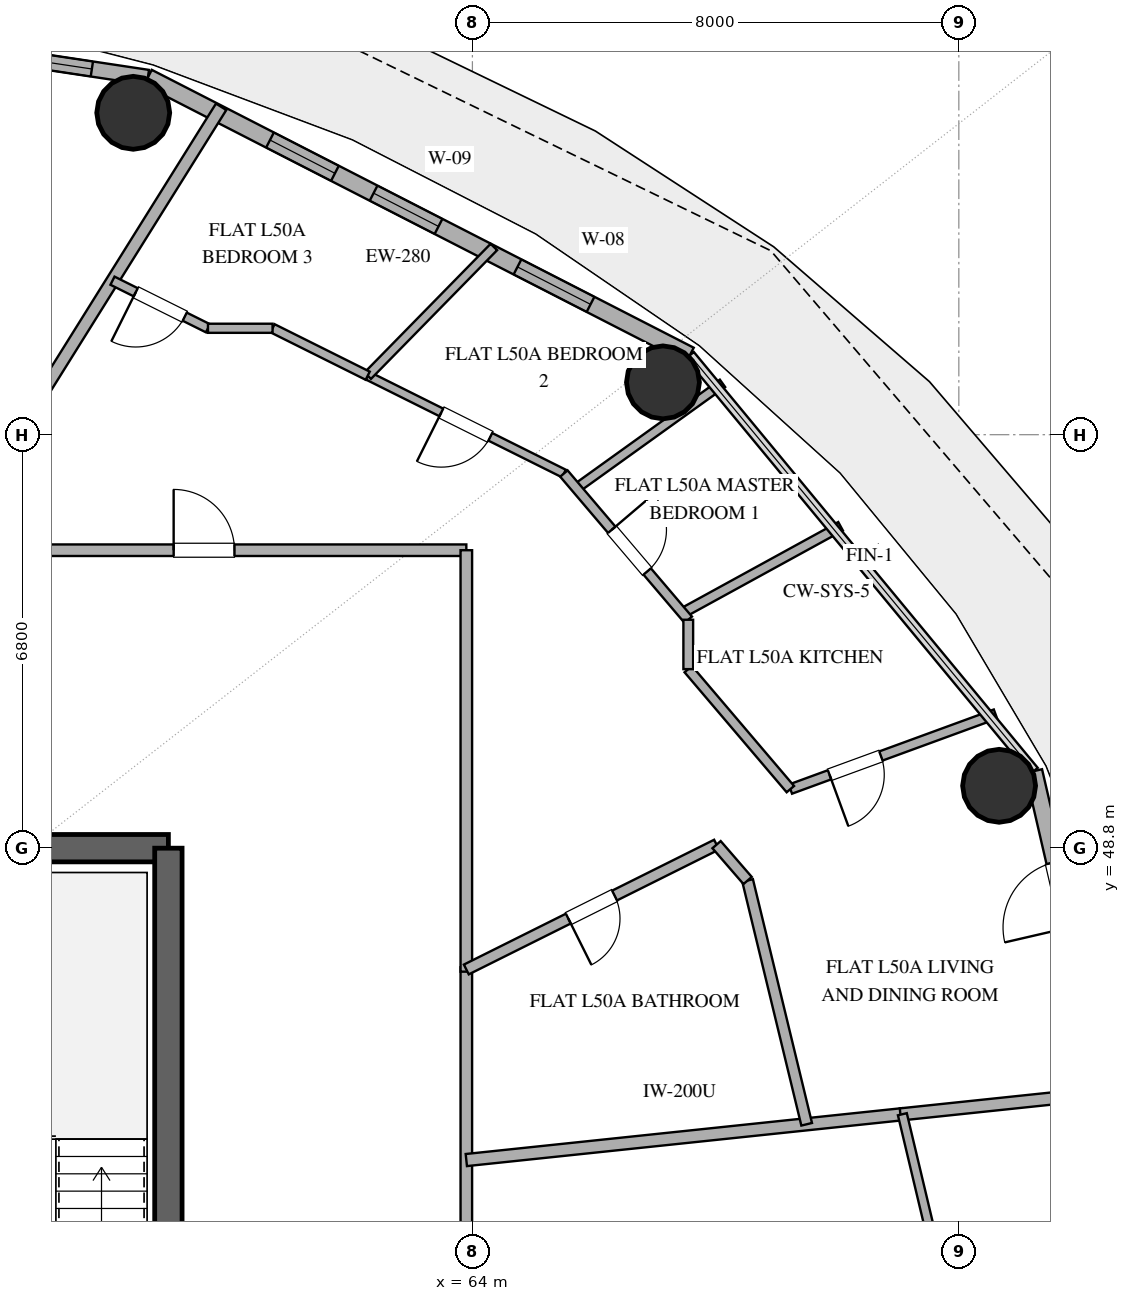
"""IFC4 building model, lengths in metres.
Left out: names, types, materials, properties, quantities, classifications, styles, units other than length and angle.
Written with IfcOpenShell. Run it as: python <this file> out.ifc"""

import sys

from ifc_helpers import new_model, si_unit, direction, frame, frame_2d, origin, origin_2d, place, context, subcontext, project, spatial, rectangle, hollow_circle, extrude, element, fill, save


model = new_model("IFC4")
c1 = context("Model", 3, precision=1e-05, world=origin(), true_north=direction((0.0, 1.0)))
c2 = subcontext(c1, "Body", "Model", "MODEL_VIEW")
j1 = project(units=[si_unit("LENGTHUNIT", "METRE"), si_unit("PLANEANGLEUNIT", "RADIAN")], contexts=[c1])
p1 = place(None, origin())
s1 = spatial("IfcSite", under=j1, at=p1, CompositionType="ELEMENT")
p2 = place(p1, origin())
s2 = spatial("IfcBuilding", under=s1, at=p2, CompositionType="ELEMENT")
p3 = place(p2, frame((0.0, 0.0, 197.4)))
s3 = spatial("IfcBuildingStorey", under=s2, at=p3, CompositionType="ELEMENT", Elevation=197.4)
p4 = place(p3, frame((55.0, 48.8, 0.0), z_axis=(0.0, 0.0, 1.0), x_axis=(1.0, 0.0, 0.0)))
e1 = element("IfcWall", 1, at=p4, inside=s3, PredefinedType="SHEAR", context=c2, shape_type="SweptSolid", body=[
    extrude(rectangle(XDim=4.0, YDim=0.45, at=frame_2d((2.0, 0.0))), origin(), (0.0, 0.0, 1.0), 3.25),
])
p5 = place(p3, frame((59.0, 35.2, 0.0), z_axis=(0.0, 0.0, 1.0), x_axis=(0.0, 1.0, 0.0)))
e2 = element("IfcWall", 2, at=p5, inside=s3, PredefinedType="SHEAR", context=c2, shape_type="SweptSolid", body=[
    extrude(rectangle(XDim=13.6, YDim=0.45, at=frame_2d((6.8, 0.0))), origin(), (0.0, 0.0, 1.0), 3.25),
])
for number, where, z_axis, x_axis in (
    (3, (72.662, 49.826, 0.0), (0.0, 0.0, 1.0), (1.0, 0.0, 0.0)),
    (4, (67.134, 56.46, 0.0), (0.0, 0.0, 1.0), (1.0, 0.0, 0.0)),
    (5, (58.422, 60.893, 0.0), (0.0, 0.0, 1.0), (1.0, 0.0, 0.0)),
):
    element("IfcColumn", number, at=place(p3, frame(where, z_axis=z_axis, x_axis=x_axis)), inside=s3, PredefinedType="COLUMN", context=c2, shape_type="SweptSolid", body=[
        extrude(hollow_circle(Radius=0.6, WallThickness=0.032, at=origin_2d()), origin(), (0.0, 0.0, 1.0), 3.25),
    ])
p6 = place(p3, frame((75.099, 42.0, 0.0), z_axis=(0.0, 0.0, 1.0), x_axis=(-0.225473184558, 0.974249374157, 0.0)))
e6 = element("IfcWall", 6, at=p6, inside=s3, PredefinedType="SOLIDWALL", context=c2, shape_type="SweptSolid", body=[
    extrude(rectangle(XDim=8.28, YDim=0.28, at=frame_2d((4.14, 0.0))), origin(), (0.0, 0.0, 1.0), 3.25),
])
p7 = place(p6, frame((5.644, 0.0, 0.0)))
e7 = element("IfcOpeningElement", 7, at=p7, cuts=e6, PredefinedType="OPENING", context=c2, shape_type="SweptSolid", body=[
    extrude(rectangle(XDim=1.1, YDim=2.25, at=frame_2d((0.55, 1.125))), frame((0.0, 0.15, 0.0), z_axis=(0.0, -1.0, 0.0), x_axis=(1.0, 0.0, 0.0)), (0.0, 0.0, 1.0), 0.3),
])
p8 = place(p6, frame((0.918, 0.0, 0.85)))
e8 = element("IfcOpeningElement", 8, at=p8, cuts=e6, PredefinedType="OPENING", context=c2, shape_type="SweptSolid", body=[
    extrude(rectangle(XDim=1.0, YDim=1.8, at=frame_2d((0.5, 0.9))), frame((0.0, 0.15, 0.0), z_axis=(0.0, -1.0, 0.0), x_axis=(1.0, 0.0, 0.0)), (0.0, 0.0, 1.0), 0.3),
])
p9 = place(p3, frame((67.576, 56.906, 0.0), z_axis=(0.0, 0.0, 1.0), x_axis=(-0.889872523182, 0.456209263919, 0.0)))
e9 = element("IfcWall", 9, at=p9, inside=s3, PredefinedType="SOLIDWALL", context=c2, shape_type="SweptSolid", body=[
    extrude(rectangle(XDim=10.016, YDim=0.28, at=frame_2d((5.008, 0.0))), origin(), (0.0, 0.0, 1.0), 3.25),
])
p10 = place(p9, frame((1.835, 0.0, 0.85)))
e10 = element("IfcOpeningElement", 10, at=p10, cuts=e9, PredefinedType="OPENING", context=c2, shape_type="SweptSolid", body=[
    extrude(rectangle(XDim=1.35, YDim=1.8, at=frame_2d((0.675, 0.9))), frame((0.0, 0.15, 0.0), z_axis=(0.0, -1.0, 0.0), x_axis=(1.0, 0.0, 0.0)), (0.0, 0.0, 1.0), 0.3),
])
p11 = place(p9, frame((4.645, 0.0, 0.85)))
e11 = element("IfcOpeningElement", 11, at=p11, cuts=e9, PredefinedType="OPENING", context=c2, shape_type="SweptSolid", body=[
    extrude(rectangle(XDim=1.2, YDim=1.8, at=frame_2d((0.6, 0.9))), frame((0.0, 0.15, 0.0), z_axis=(0.0, -1.0, 0.0), x_axis=(1.0, 0.0, 0.0)), (0.0, 0.0, 1.0), 0.3),
])
p12 = place(p9, frame((6.559, 0.0, 0.85)))
e12 = element("IfcOpeningElement", 12, at=p12, cuts=e9, PredefinedType="OPENING", context=c2, shape_type="SweptSolid", body=[
    extrude(rectangle(XDim=1.2, YDim=1.8, at=frame_2d((0.6, 0.9))), frame((0.0, 0.15, 0.0), z_axis=(0.0, -1.0, 0.0), x_axis=(1.0, 0.0, 0.0)), (0.0, 0.0, 1.0), 0.3),
])
p13 = place(p3, frame((58.663, 61.475, 0.0), z_axis=(0.0, 0.0, 1.0), x_axis=(-0.988863993413, 0.148822049884, 0.0)))
e13 = element("IfcWall", 13, at=p13, inside=s3, PredefinedType="SOLIDWALL", context=c2, shape_type="SweptSolid", body=[
    extrude(rectangle(XDim=10.783, YDim=0.25, at=frame_2d((5.392, 0.0))), origin(), (0.0, 0.0, 1.0), 3.25),
])
p14 = place(p13, frame((0.932, 0.0, 1.42)))
e14 = element("IfcOpeningElement", 14, at=p14, cuts=e13, PredefinedType="OPENING", context=c2, shape_type="SweptSolid", body=[
    extrude(rectangle(XDim=1.0, YDim=1.05, at=frame_2d((0.5, 0.525))), frame((0.0, 0.135, 0.0), z_axis=(0.0, -1.0, 0.0), x_axis=(1.0, 0.0, 0.0)), (0.0, 0.0, 1.0), 0.27),
])
p15 = place(p3, frame((44.784, 53.7, 0.0), z_axis=(0.0, 0.0, 1.0), x_axis=(1.0, 0.0, 0.0)))
e15 = element("IfcWall", 15, at=p15, inside=s3, PredefinedType="PARTITIONING", context=c2, shape_type="SweptSolid", body=[
    extrude(rectangle(XDim=19.116, YDim=0.19, at=frame_2d((9.558, 0.0))), origin(), (0.0, 0.0, 1.0), 2.61),
])
p16 = place(p15, frame((14.302, 0.0, 0.0)))
e16 = element("IfcOpeningElement", 16, at=p16, cuts=e15, PredefinedType="OPENING", context=c2, shape_type="SweptSolid", body=[
    extrude(rectangle(XDim=1.0, YDim=2.2, at=frame_2d((0.5, 1.1))), frame((0.0, 0.105, 0.0), z_axis=(0.0, -1.0, 0.0), x_axis=(1.0, 0.0, 0.0)), (0.0, 0.0, 1.0), 0.21),
])
p17 = place(p15, frame((6.783, 0.0, 0.0)))
e17 = element("IfcOpeningElement", 17, at=p17, cuts=e15, PredefinedType="OPENING", context=c2, shape_type="SweptSolid", body=[
    extrude(rectangle(XDim=1.0, YDim=2.2, at=frame_2d((0.5, 1.1))), frame((0.0, 0.105, 0.0), z_axis=(0.0, -1.0, 0.0), x_axis=(1.0, 0.0, 0.0)), (0.0, 0.0, 1.0), 0.21),
])
p18 = place(p3, frame((63.9, 46.841, 0.0), z_axis=(0.0, 0.0, 1.0), x_axis=(0.0, -1.0, 0.0)))
e18 = element("IfcWall", 18, at=p18, inside=s3, PredefinedType="PARTITIONING", context=c2, shape_type="SweptSolid", body=[
    extrude(rectangle(XDim=12.632, YDim=0.19, at=frame_2d((6.316, 0.0))), origin(), (0.0, 0.0, 1.0), 2.61),
])
p19 = place(p3, frame((63.9, 53.7, 0.0), z_axis=(0.0, 0.0, 1.0), x_axis=(0.0, -1.0, 0.0)))
e19 = element("IfcWall", 19, at=p19, inside=s3, PredefinedType="PARTITIONING", context=c2, shape_type="SweptSolid", body=[
    extrude(rectangle(XDim=6.931, YDim=0.19, at=frame_2d((3.465, 0.0))), origin(), (0.0, 0.0, 1.0), 2.61),
])
p20 = place(p3, frame((63.9, 43.671, 0.0), z_axis=(0.0, 0.0, 1.0), x_axis=(0.994523063153, 0.104517351942, 0.0)))
e20 = element("IfcWall", 20, at=p20, inside=s3, PredefinedType="PARTITIONING", context=c2, shape_type="SweptSolid", body=[
    extrude(rectangle(XDim=7.211, YDim=0.2, at=frame_2d((3.605, 0.0))), origin(), (0.0, 0.0, 1.0), 2.61),
])
p21 = place(p3, frame((55.311, 53.7, 0.0), z_axis=(0.0, 0.0, 1.0), x_axis=(0.529914717401, 0.848050937315, 0.0)))
e21 = element("IfcWall", 21, at=p21, inside=s3, PredefinedType="PARTITIONING", context=c2, shape_type="SweptSolid", body=[
    extrude(rectangle(XDim=8.599, YDim=0.2, at=frame_2d((4.299, 0.0))), origin(), (0.0, 0.0, 1.0), 2.61),
])
p22 = place(p3, frame((68.016, 48.858, 0.0), z_axis=(0.0, 0.0, 1.0), x_axis=(-0.894872643331, -0.446321579377, 0.0)))
e22 = element("IfcWall", 22, at=p22, inside=s3, PredefinedType="PLUMBINGWALL", context=c2, shape_type="SweptSolid", body=[
    extrude(rectangle(XDim=4.599, YDim=0.18, at=frame_2d((2.3, 0.0))), origin(), (0.0, 0.0, 1.0), 2.61),
])
p23 = place(p22, frame((1.875, 0.0, 0.0)))
e23 = element("IfcOpeningElement", 23, at=p23, cuts=e22, PredefinedType="OPENING", context=c2, shape_type="SweptSolid", body=[
    extrude(rectangle(XDim=0.85, YDim=2.1, at=frame_2d((0.425, 1.05))), frame((0.0, 0.1, 0.0), z_axis=(0.0, -1.0, 0.0), x_axis=(1.0, 0.0, 0.0)), (0.0, 0.0, 1.0), 0.2),
])
p24 = place(p3, frame((69.498, 44.26, 0.0), z_axis=(0.0, 0.0, 1.0), x_axis=(-0.235510241151, 0.97187186723, 0.0)))
e24 = element("IfcWall", 24, at=p24, inside=s3, PredefinedType="PLUMBINGWALL", context=c2, shape_type="SweptSolid", body=[
    extrude(rectangle(XDim=4.125, YDim=0.18, at=frame_2d((2.062, 0.0))), origin(), (0.0, 0.0, 1.0), 2.61),
])
p25 = place(p3, frame((65.505, 54.961, 0.0), z_axis=(0.0, 0.0, 1.0), x_axis=(-0.894941244144, 0.4461840086, 0.0)))
e25 = element("IfcWall", 25, at=p25, inside=s3, PredefinedType="PARTITIONING", context=c2, shape_type="SweptSolid", body=[
    extrude(rectangle(XDim=3.605, YDim=0.14, at=frame_2d((1.803, 0.0))), origin(), (0.0, 0.0, 1.0), 2.61),
])
p26 = place(p25, frame((1.353, 0.0, 0.0)))
e26 = element("IfcOpeningElement", 26, at=p26, cuts=e25, PredefinedType="OPENING", context=c2, shape_type="SweptSolid", body=[
    extrude(rectangle(XDim=0.9, YDim=2.1, at=frame_2d((0.45, 1.05))), frame((0.0, 0.08, 0.0), z_axis=(0.0, -1.0, 0.0), x_axis=(1.0, 0.0, 0.0)), (0.0, 0.0, 1.0), 0.16),
])
p27 = place(p3, frame((72.603, 51.006, 0.0), z_axis=(0.0, 0.0, 1.0), x_axis=(-0.939057046145, -0.343761347572, 0.0)))
e27 = element("IfcWall", 27, at=p27, inside=s3, PredefinedType="PLUMBINGWALL", context=c2, shape_type="SweptSolid", body=[
    extrude(rectangle(XDim=3.592, YDim=0.16, at=frame_2d((1.796, 0.0))), origin(), (0.0, 0.0, 1.0), 2.61),
])
p28 = place(p27, frame((2.006, 0.0, 0.0)))
e28 = element("IfcOpeningElement", 28, at=p28, cuts=e27, PredefinedType="OPENING", context=c2, shape_type="SweptSolid", body=[
    extrude(rectangle(XDim=0.9, YDim=2.1, at=frame_2d((0.45, 1.05))), frame((0.0, 0.09, 0.0), z_axis=(0.0, -1.0, 0.0), x_axis=(1.0, 0.0, 0.0)), (0.0, 0.0, 1.0), 0.18),
])
p29 = place(p3, frame((74.575, 44.793, 0.0), z_axis=(0.0, 0.0, 1.0), x_axis=(-0.994516359121, -0.104581123727, 0.0)))
e29 = element("IfcWall", 29, at=p29, inside=s3, PredefinedType="PARTITIONING", context=c2, shape_type="SweptSolid", body=[
    extrude(rectangle(XDim=3.555, YDim=0.2, at=frame_2d((1.778, 0.0))), origin(), (0.0, 0.0, 1.0), 2.61),
])
p30 = place(p3, frame((67.455, 52.668, 0.0), z_axis=(0.0, 0.0, 1.0), x_axis=(0.876839283097, 0.480783601653, 0.0)))
e30 = element("IfcWall", 30, at=p30, inside=s3, PredefinedType="PLUMBINGWALL", context=c2, shape_type="SweptSolid", body=[
    extrude(rectangle(XDim=2.965, YDim=0.16, at=frame_2d((1.482, 0.0))), origin(), (0.0, 0.0, 1.0), 2.61),
])
p31 = place(p3, frame((64.353, 58.687, 0.0), z_axis=(0.0, 0.0, 1.0), x_axis=(-0.699905055024, -0.714235895172, 0.0)))
e31 = element("IfcWall", 31, at=p31, inside=s3, PredefinedType="PARTITIONING", context=c2, shape_type="SweptSolid", body=[
    extrude(rectangle(XDim=2.964, YDim=0.15, at=frame_2d((1.482, 0.0))), origin(), (0.0, 0.0, 1.0), 2.61),
])
p32 = place(p3, frame((68.113, 56.444, 0.0), z_axis=(0.0, 0.0, 1.0), x_axis=(-0.812258557349, -0.583297553581, 0.0)))
e32 = element("IfcWall", 32, at=p32, inside=s3, PredefinedType="PARTITIONING", context=c2, shape_type="SweptSolid", body=[
    extrude(rectangle(XDim=2.958, YDim=0.15, at=frame_2d((1.479, 0.0))), origin(), (0.0, 0.0, 1.0), 2.61),
])
p33 = place(p3, frame((65.505, 54.961, 0.0), z_axis=(0.0, 0.0, 1.0), x_axis=(0.647888606369, -0.761735094201, 0.0)))
e33 = element("IfcWall", 33, at=p33, inside=s3, PredefinedType="PLUMBINGWALL", context=c2, shape_type="SweptSolid", body=[
    extrude(rectangle(XDim=3.157, YDim=0.16, at=frame_2d((1.578, 0.0))), origin(), (0.0, 0.0, 1.0), 2.61),
])
p34 = place(p33, frame((1.215, 0.0, 0.0)))
e34 = element("IfcOpeningElement", 34, at=p34, cuts=e33, PredefinedType="OPENING", context=c2, shape_type="SweptSolid", body=[
    extrude(rectangle(XDim=0.9, YDim=2.1, at=frame_2d((0.45, 1.05))), frame((0.0, 0.09, 0.0), z_axis=(0.0, -1.0, 0.0), x_axis=(1.0, 0.0, 0.0)), (0.0, 0.0, 1.0), 0.18),
])
p35 = place(p3, frame((69.229, 49.771, 0.0), z_axis=(0.0, 0.0, 1.0), x_axis=(-0.648055845939, 0.761592818076, 0.0)))
e35 = element("IfcWall", 35, at=p35, inside=s3, PredefinedType="PLUMBINGWALL", context=c2, shape_type="SweptSolid", body=[
    extrude(rectangle(XDim=2.591, YDim=0.16, at=frame_2d((1.295, 0.0))), origin(), (0.0, 0.0, 1.0), 2.61),
])
p36 = place(p3, frame((71.649, 42.0, 0.0), z_axis=(0.0, 0.0, 1.0), x_axis=(-0.231642596653, 0.972800959814, 0.0)))
e36 = element("IfcWall", 36, at=p36, inside=s3, PredefinedType="PARTITIONING", context=c2, shape_type="SweptSolid", body=[
    extrude(rectangle(XDim=2.493, YDim=0.15, at=frame_2d((1.246, 0.0))), origin(), (0.0, 0.0, 1.0), 2.61),
])
p37 = place(p3, frame((59.651, 57.35, 0.0), z_axis=(0.0, 0.0, 1.0), x_axis=(-0.895038630404, 0.445988621027, 0.0)))
e37 = element("IfcWall", 37, at=p37, inside=s3, PredefinedType="PARTITIONING", context=c2, shape_type="SweptSolid", body=[
    extrude(rectangle(XDim=1.754, YDim=0.15, at=frame_2d((0.877, 0.0))), origin(), (0.0, 0.0, 1.0), 2.61),
])
p38 = place(p37, frame((0.427, 0.0, 0.0)))
e38 = element("IfcOpeningElement", 38, at=p38, cuts=e37, PredefinedType="OPENING", context=c2, shape_type="SweptSolid", body=[
    extrude(rectangle(XDim=0.9, YDim=2.1, at=frame_2d((0.45, 1.05))), frame((0.0, 0.085, 0.0), z_axis=(0.0, -1.0, 0.0), x_axis=(1.0, 0.0, 0.0)), (0.0, 0.0, 1.0), 0.17),
])
p39 = place(p3, frame((62.278, 56.57, 0.0), z_axis=(0.0, 0.0, 1.0), x_axis=(-0.894929238491, 0.446208088333, 0.0)))
e39 = element("IfcWall", 39, at=p39, inside=s3, PredefinedType="PARTITIONING", context=c2, shape_type="SweptSolid", body=[
    extrude(rectangle(XDim=1.749, YDim=0.15, at=frame_2d((0.875, 0.0))), origin(), (0.0, 0.0, 1.0), 2.61),
])
p40 = place(p3, frame((60.713, 57.35, 0.0), z_axis=(0.0, 0.0, 1.0), x_axis=(-1.0, 0.0, 0.0)))
e40 = element("IfcWall", 40, at=p40, inside=s3, PredefinedType="PARTITIONING", context=c2, shape_type="SweptSolid", body=[
    extrude(rectangle(XDim=1.062, YDim=0.15, at=frame_2d((0.531, 0.0))), origin(), (0.0, 0.0, 1.0), 2.61),
])
p41 = place(p3, frame((67.55, 51.744, 0.0), z_axis=(0.0, 0.0, 1.0), x_axis=(0.0, 1.0, 0.0)))
e41 = element("IfcWall", 41, at=p41, inside=s3, PredefinedType="PLUMBINGWALL", context=c2, shape_type="SweptSolid", body=[
    extrude(rectangle(XDim=0.812, YDim=0.16, at=frame_2d((0.406, 0.0))), origin(), (0.0, 0.0, 1.0), 2.61),
])
p42 = place(p3, frame((68.526, 48.268, 0.0), z_axis=(0.0, 0.0, 1.0), x_axis=(-0.654572928685, 0.755998863116, 0.0)))
e42 = element("IfcWall", 42, at=p42, inside=s3, PredefinedType="PLUMBINGWALL", context=c2, shape_type="SweptSolid", body=[
    extrude(rectangle(XDim=0.78, YDim=0.18, at=frame_2d((0.39, 0.0))), origin(), (0.0, 0.0, 1.0), 2.61),
])
p43 = place(p10, origin())
e43 = element("IfcWindow", 43, at=p43, inside=s3, PartitioningType="SINGLE_PANEL", PredefinedType="WINDOW", context=c2, shape_type="SweptSolid", body=[
    extrude(rectangle(XDim=1.35, YDim=1.8, at=frame_2d((0.675, 0.9))), frame((0.0, 0.03, 0.0), z_axis=(0.0, -1.0, 0.0), x_axis=(1.0, 0.0, 0.0)), (0.0, 0.0, 1.0), 0.06),
])
fill(e10, e43)
p44 = place(p11, origin())
e44 = element("IfcWindow", 44, at=p44, inside=s3, PartitioningType="SINGLE_PANEL", PredefinedType="WINDOW", context=c2, shape_type="SweptSolid", body=[
    extrude(rectangle(XDim=1.2, YDim=1.8, at=frame_2d((0.6, 0.9))), frame((0.0, 0.03, 0.0), z_axis=(0.0, -1.0, 0.0), x_axis=(1.0, 0.0, 0.0)), (0.0, 0.0, 1.0), 0.06),
])
fill(e11, e44)
p45 = place(p12, origin())
e45 = element("IfcWindow", 45, at=p45, inside=s3, PartitioningType="SINGLE_PANEL", PredefinedType="WINDOW", context=c2, shape_type="SweptSolid", body=[
    extrude(rectangle(XDim=1.2, YDim=1.8, at=frame_2d((0.6, 0.9))), frame((0.0, 0.03, 0.0), z_axis=(0.0, -1.0, 0.0), x_axis=(1.0, 0.0, 0.0)), (0.0, 0.0, 1.0), 0.06),
])
fill(e12, e45)
p46 = place(p14, origin())
e46 = element("IfcWindow", 46, at=p46, inside=s3, PartitioningType="SINGLE_PANEL", PredefinedType="WINDOW", context=c2, shape_type="SweptSolid", body=[
    extrude(rectangle(XDim=1.0, YDim=1.05, at=frame_2d((0.5, 0.525))), frame((0.0, 0.03, 0.0), z_axis=(0.0, -1.0, 0.0), x_axis=(1.0, 0.0, 0.0)), (0.0, 0.0, 1.0), 0.06),
])
fill(e14, e46)
p47 = place(p16, origin())
e47 = element("IfcDoor", 47, at=p47, inside=s3, OperationType="SINGLE_SWING_LEFT", PredefinedType="DOOR", context=c2, shape_type="SweptSolid", body=[
    extrude(rectangle(XDim=1.0, YDim=2.2, at=frame_2d((0.5, 1.1))), frame((0.0, 0.025, 0.0), z_axis=(0.0, -1.0, 0.0), x_axis=(1.0, 0.0, 0.0)), (0.0, 0.0, 1.0), 0.05),
])
fill(e16, e47)
p48 = place(p23, origin())
e48 = element("IfcDoor", 48, at=p48, inside=s3, OperationType="SINGLE_SWING_RIGHT", PredefinedType="DOOR", context=c2, shape_type="SweptSolid", body=[
    extrude(rectangle(XDim=0.85, YDim=2.1, at=frame_2d((0.425, 1.05))), frame((0.0, 0.025, 0.0), z_axis=(0.0, -1.0, 0.0), x_axis=(1.0, 0.0, 0.0)), (0.0, 0.0, 1.0), 0.05),
])
fill(e23, e48)
p49 = place(p26, origin())
e49 = element("IfcDoor", 49, at=p49, inside=s3, OperationType="SINGLE_SWING_RIGHT", PredefinedType="DOOR", context=c2, shape_type="SweptSolid", body=[
    extrude(rectangle(XDim=0.9, YDim=2.1, at=frame_2d((0.45, 1.05))), frame((0.0, 0.025, 0.0), z_axis=(0.0, -1.0, 0.0), x_axis=(1.0, 0.0, 0.0)), (0.0, 0.0, 1.0), 0.05),
])
fill(e26, e49)
p50 = place(p28, origin())
e50 = element("IfcDoor", 50, at=p50, inside=s3, OperationType="SINGLE_SWING_RIGHT", PredefinedType="DOOR", context=c2, shape_type="SweptSolid", body=[
    extrude(rectangle(XDim=0.9, YDim=2.1, at=frame_2d((0.45, 1.05))), frame((0.0, 0.025, 0.0), z_axis=(0.0, -1.0, 0.0), x_axis=(1.0, 0.0, 0.0)), (0.0, 0.0, 1.0), 0.05),
])
fill(e28, e50)
p51 = place(p34, origin())
e51 = element("IfcDoor", 51, at=p51, inside=s3, OperationType="SINGLE_SWING_LEFT", PredefinedType="DOOR", context=c2, shape_type="SweptSolid", body=[
    extrude(rectangle(XDim=0.9, YDim=2.1, at=frame_2d((0.45, 1.05))), frame((0.0, 0.025, 0.0), z_axis=(0.0, -1.0, 0.0), x_axis=(1.0, 0.0, 0.0)), (0.0, 0.0, 1.0), 0.05),
])
fill(e34, e51)
p52 = place(p38, origin())
e52 = element("IfcDoor", 52, at=p52, inside=s3, OperationType="SINGLE_SWING_RIGHT", PredefinedType="DOOR", context=c2, shape_type="SweptSolid", body=[
    extrude(rectangle(XDim=0.9, YDim=2.1, at=frame_2d((0.45, 1.05))), frame((0.0, 0.025, 0.0), z_axis=(0.0, -1.0, 0.0), x_axis=(1.0, 0.0, 0.0)), (0.0, 0.0, 1.0), 0.05),
])
fill(e38, e52)
save(model, sys.argv[1])
